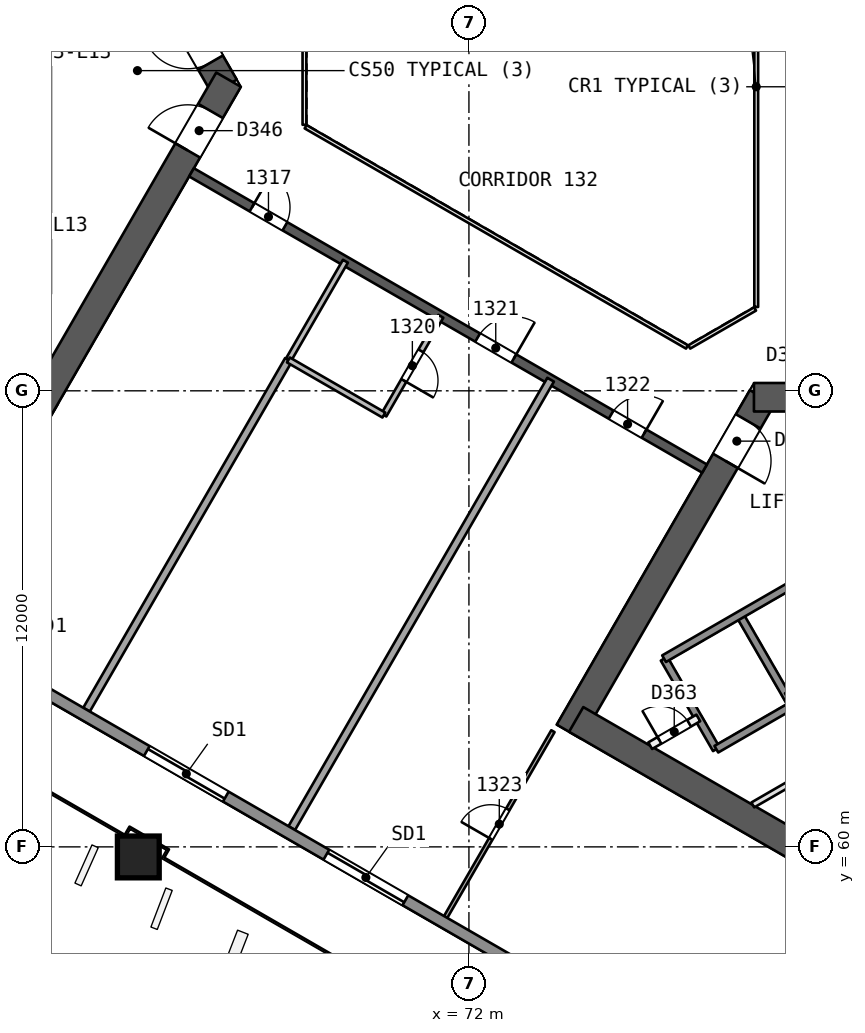
"""IFC4 building model, lengths in metres.
Left out: names, types, materials, properties, quantities, classifications, styles, units other than length and angle.
Written with IfcOpenShell. Run it as: python <this file> out.ifc"""

import sys

from ifc_helpers import new_model, si_unit, direction, frame, frame_2d, origin, origin_2d, place, context, subcontext, project, spatial, rectangle, extrude, element, fill, save


model = new_model("IFC4")
c1 = context("Model", 3, precision=1e-05, world=origin(), true_north=direction((0.0, 1.0)))
c2 = subcontext(c1, "Body", "Model", "MODEL_VIEW")
j1 = project(units=[si_unit("LENGTHUNIT", "METRE"), si_unit("PLANEANGLEUNIT", "RADIAN")], contexts=[c1])
p1 = place(None, origin())
s1 = spatial("IfcSite", under=j1, at=p1, CompositionType="ELEMENT")
p2 = place(p1, origin())
s2 = spatial("IfcBuilding", under=s1, at=p2, CompositionType="ELEMENT")
p3 = place(p2, frame((0.0, 0.0, 61.0)))
s3 = spatial("IfcBuildingStorey", under=s2, at=p3, CompositionType="ELEMENT", Elevation=61.0)
p4 = place(p3, frame((65.567, 80.0, 0.0), z_axis=(0.0, 0.0, 1.0), x_axis=(-0.499988615364, 0.866031976607, 0.0)))
e1 = element("IfcWall", 1, at=p4, inside=s3, PredefinedType="SHEAR", context=c2, shape_type="SweptSolid", body=[
    extrude(rectangle(XDim=10.163, YDim=0.75, at=frame_2d((5.082, 0.0))), origin(), (0.0, 0.0, 1.0), 3.7),
])
p5 = place(p4, frame((0.733, 0.0, 0.0)))
e2 = element("IfcOpeningElement", 2, at=p5, cuts=e1, PredefinedType="OPENING", context=c2, shape_type="SweptSolid", body=[
    extrude(rectangle(XDim=1.2, YDim=2.1, at=frame_2d((0.6, 1.05))), frame((0.0, 0.385, 0.0), z_axis=(0.0, -1.0, 0.0), x_axis=(1.0, 0.0, 0.0)), (0.0, 0.0, 1.0), 0.771),
])
p6 = place(p3, frame((48.772, 78.394, 0.0), z_axis=(0.0, 0.0, 1.0), x_axis=(0.866028339916, -0.499994914436, 0.0)))
e3 = element("IfcWall", 3, at=p6, inside=s3, PredefinedType="SHEAR", context=c2, shape_type="SweptSolid", body=[
    extrude(rectangle(XDim=14.117, YDim=0.75, at=frame_2d((7.059, 0.0))), origin(), (0.0, 0.0, 1.0), 3.7),
])
p7 = place(p3, frame((60.673, 71.523, 0.0), z_axis=(0.0, 0.0, 1.0), x_axis=(0.499997052475, 0.866027105532, 0.0)))
e4 = element("IfcWall", 4, at=p7, inside=s3, PredefinedType="SHEAR", context=c2, shape_type="SweptSolid", body=[
    extrude(rectangle(XDim=10.005, YDim=0.75, at=frame_2d((5.002, 0.0))), origin(), (0.0, 0.0, 1.0), 3.7),
])
p8 = place(p7, frame((7.855, 0.0, 0.0)))
e5 = element("IfcOpeningElement", 5, at=p8, cuts=e4, PredefinedType="OPENING", context=c2, shape_type="SweptSolid", body=[
    extrude(rectangle(XDim=1.2, YDim=2.1, at=frame_2d((0.6, 1.05))), frame((0.0, 0.385, 0.0), z_axis=(0.0, -1.0, 0.0), x_axis=(1.0, 0.0, 0.0)), (0.0, 0.0, 1.0), 0.771),
])
p9 = place(p3, frame((79.717, 71.831, 0.0), z_axis=(0.0, 0.0, 1.0), x_axis=(-0.499996230114, -0.866027580318, 0.0)))
e6 = element("IfcWall", 6, at=p9, inside=s3, PredefinedType="SHEAR", context=c2, shape_type="SweptSolid", body=[
    extrude(rectangle(XDim=10.164, YDim=0.75, at=frame_2d((5.082, 0.0))), origin(), (0.0, 0.0, 1.0), 3.7),
])
p10 = place(p9, frame((0.733, 0.0, 0.0)))
e7 = element("IfcOpeningElement", 7, at=p10, cuts=e6, PredefinedType="OPENING", context=c2, shape_type="SweptSolid", body=[
    extrude(rectangle(XDim=1.2, YDim=2.1, at=frame_2d((0.6, 1.05))), frame((0.0, 0.385, 0.0), z_axis=(0.0, -1.0, 0.0), x_axis=(1.0, 0.0, 0.0)), (0.0, 0.0, 1.0), 0.771),
])
p11 = place(p3, frame((74.822, 63.354, 0.0), z_axis=(0.0, 0.0, 1.0), x_axis=(0.8660248072, -0.500001033313, 0.0)))
e8 = element("IfcWall", 8, at=p11, inside=s3, PredefinedType="SHEAR", context=c2, shape_type="SweptSolid", body=[
    extrude(rectangle(XDim=13.958, YDim=0.75, at=frame_2d((6.979, 0.0))), origin(), (0.0, 0.0, 1.0), 3.7),
])
p12 = place(p3, frame((89.505, 71.831, 0.0), z_axis=(0.0, 0.0, 1.0), x_axis=(-1.0, 0.0, 0.0)))
e9 = element("IfcWall", 9, at=p12, inside=s3, PredefinedType="SHEAR", context=c2, shape_type="SweptSolid", body=[
    extrude(rectangle(XDim=10.005, YDim=0.75, at=frame_2d((5.002, 0.0))), origin(), (0.0, 0.0, 1.0), 3.7),
])
p13 = place(p12, frame((7.855, 0.0, 0.0)))
e10 = element("IfcOpeningElement", 10, at=p13, cuts=e9, PredefinedType="OPENING", context=c2, shape_type="SweptSolid", body=[
    extrude(rectangle(XDim=1.2, YDim=2.1, at=frame_2d((0.6, 1.05))), frame((0.0, 0.385, 0.0), z_axis=(0.0, -1.0, 0.0), x_axis=(1.0, 0.0, 0.0)), (0.0, 0.0, 1.0), 0.771),
])
p14 = place(p3, frame((64.7, 77.748, 0.0), z_axis=(0.0, 0.0, 1.0), x_axis=(0.866026492143, -0.499998114903, 0.0)))
e11 = element("IfcWall", 11, at=p14, inside=s3, PredefinedType="SHEAR", context=c2, shape_type="SweptSolid", body=[
    extrude(rectangle(XDim=15.588, YDim=0.25, at=frame_2d((7.794, 0.0))), origin(), (0.0, 0.0, 1.0), 3.2),
])
p15 = place(p14, frame((1.838, 0.0, 0.0)))
e12 = element("IfcOpeningElement", 12, at=p15, cuts=e11, PredefinedType="OPENING", context=c2, shape_type="SweptSolid", body=[
    extrude(rectangle(XDim=1.0, YDim=2.1, at=frame_2d((0.5, 1.05))), frame((0.0, 0.135, 0.0), z_axis=(0.0, -1.0, 0.0), x_axis=(1.0, 0.0, 0.0)), (0.0, 0.0, 1.0), 0.271),
])
p16 = place(p14, frame((8.694, 0.0, 0.0)))
e13 = element("IfcOpeningElement", 13, at=p16, cuts=e11, PredefinedType="OPENING", context=c2, shape_type="SweptSolid", body=[
    extrude(rectangle(XDim=1.1, YDim=2.1, at=frame_2d((0.55, 1.05))), frame((0.0, 0.135, 0.0), z_axis=(0.0, -1.0, 0.0), x_axis=(1.0, 0.0, 0.0)), (0.0, 0.0, 1.0), 0.271),
])
p17 = place(p14, frame((12.75, 0.0, 0.0)))
e14 = element("IfcOpeningElement", 14, at=p17, cuts=e11, PredefinedType="OPENING", context=c2, shape_type="SweptSolid", body=[
    extrude(rectangle(XDim=1.0, YDim=2.1, at=frame_2d((0.5, 1.05))), frame((0.0, 0.135, 0.0), z_axis=(0.0, -1.0, 0.0), x_axis=(1.0, 0.0, 0.0)), (0.0, 0.0, 1.0), 0.271),
])
p18 = place(p3, frame((63.288, 59.714, 0.0), z_axis=(0.010093620709, 0.017482414954, 0.999796221231), x_axis=(-0.499907122366, -0.865843723195, 0.020187025824)))
e15 = element("IfcColumn", 15, at=p18, inside=s3, PredefinedType="COLUMN", context=c2, shape_type="SweptSolid", body=[
    extrude(rectangle(XDim=1.1, YDim=1.1, at=origin_2d()), origin(), (0.0, 0.0, 1.0), 3.701),
])
p19 = place(p3, frame((61.938, 63.61, 0.0), z_axis=(0.0, 0.0, 1.0), x_axis=(0.499994284652, 0.866028703517, 0.0)))
e16 = element("IfcWall", 16, at=p19, inside=s3, PredefinedType="PARTITIONING", context=c2, shape_type="SweptSolid", body=[
    extrude(rectangle(XDim=10.625, YDim=0.2, at=frame_2d((5.312, 0.0))), origin(), (0.0, 0.0, 1.0), 3.2),
])
p20 = place(p3, frame((67.25, 72.812, 0.0), z_axis=(0.0, 0.0, 1.0), x_axis=(0.499990139034, 0.866031096941, 0.0)))
e17 = element("IfcWall", 17, at=p20, inside=s3, PredefinedType="PARTITIONING", context=c2, shape_type="SweptSolid", body=[
    extrude(rectangle(XDim=3.0, YDim=0.15, at=frame_2d((1.5, 0.0))), origin(), (0.0, 0.0, 1.0), 3.2),
])
p21 = place(p3, frame((71.261, 73.96, 0.0), z_axis=(0.0, 0.0, 1.0), x_axis=(-0.50002537861, -0.866010750942, 0.0)))
e18 = element("IfcWall", 18, at=p21, inside=s3, PredefinedType="PARTITIONING", context=c2, shape_type="SweptSolid", body=[
    extrude(rectangle(XDim=3.0, YDim=0.15, at=frame_2d((1.5, 0.0))), origin(), (0.0, 0.0, 1.0), 3.2),
])
p22 = place(p21, frame((1.05, 0.0, 0.0)))
e19 = element("IfcOpeningElement", 19, at=p22, cuts=e18, PredefinedType="OPENING", context=c2, shape_type="SweptSolid", body=[
    extrude(rectangle(XDim=0.9, YDim=2.1, at=frame_2d((0.45, 1.05))), frame((0.0, 0.085, 0.0), z_axis=(0.0, -1.0, 0.0), x_axis=(1.0, 0.0, 0.0)), (0.0, 0.0, 1.0), 0.171),
])
p23 = place(p3, frame((69.761, 71.362, 0.0), z_axis=(0.0, 0.0, 1.0), x_axis=(-0.866032775405, 0.499987231761, 0.0)))
e20 = element("IfcWall", 20, at=p23, inside=s3, PredefinedType="PARTITIONING", context=c2, shape_type="SweptSolid", body=[
    extrude(rectangle(XDim=2.9, YDim=0.15, at=frame_2d((1.45, 0.0))), origin(), (0.0, 0.0, 1.0), 3.2),
])
p24 = place(p3, frame((67.337, 60.493, 0.0), z_axis=(0.0, 0.0, 1.0), x_axis=(0.49999337185, 0.866029230515, 0.0)))
e21 = element("IfcWall", 21, at=p24, inside=s3, PredefinedType="PARTITIONING", context=c2, shape_type="SweptSolid", body=[
    extrude(rectangle(XDim=13.625, YDim=0.2, at=frame_2d((6.812, 0.0))), origin(), (0.0, 0.0, 1.0), 3.2),
])
p25 = place(p3, frame((71.387, 58.154, 0.0), z_axis=(0.0, 0.0, 1.0), x_axis=(0.499975725007, 0.866039418504, 0.0)))
e22 = element("IfcWall", 22, at=p25, inside=s3, PredefinedType="PARTITIONING", context=c2, shape_type="SweptSolid", body=[
    extrude(rectangle(XDim=5.646, YDim=0.1, at=frame_2d((2.823, 0.0))), origin(), (0.0, 0.0, 1.0), 3.2),
])
p26 = place(p25, frame((2.373, 0.0, 0.0)))
e23 = element("IfcOpeningElement", 23, at=p26, cuts=e22, PredefinedType="OPENING", context=c2, shape_type="SweptSolid", body=[
    extrude(rectangle(XDim=0.9, YDim=2.1, at=frame_2d((0.45, 1.05))), frame((0.0, 0.061, 0.0), z_axis=(0.0, -1.0, 0.0), x_axis=(1.0, 0.0, 0.0)), (0.0, 0.0, 1.0), 0.121),
])
p27 = place(p3, frame((90.555, 46.916, 0.0), z_axis=(0.0, 0.0, 1.0), x_axis=(-0.866024926003, 0.500000827541, 0.0)))
e24 = element("IfcWall", 24, at=p27, inside=s3, PredefinedType="SOLIDWALL", context=c2, shape_type="SweptSolid", body=[
    extrude(rectangle(XDim=60.025, YDim=0.3, at=frame_2d((30.013, 0.0))), origin(), (0.0, 0.0, 1.0), 3.2),
])
p28 = place(p27, frame((28.813, 0.0, 0.0)))
e25 = element("IfcOpeningElement", 25, at=p28, cuts=e24, PredefinedType="OPENING", context=c2, shape_type="SweptSolid", body=[
    extrude(rectangle(XDim=2.4, YDim=2.4, at=frame_2d((1.2, 1.2))), frame((0.0, 0.161, 0.0), z_axis=(0.0, -1.0, 0.0), x_axis=(1.0, 0.0, 0.0)), (0.0, 0.0, 1.0), 0.321),
])
p29 = place(p27, frame((34.269, 0.0, 0.0)))
e26 = element("IfcOpeningElement", 26, at=p29, cuts=e24, PredefinedType="OPENING", context=c2, shape_type="SweptSolid", body=[
    extrude(rectangle(XDim=2.4, YDim=2.4, at=frame_2d((1.2, 1.2))), frame((0.0, 0.161, 0.0), z_axis=(0.0, -1.0, 0.0), x_axis=(1.0, 0.0, 0.0)), (0.0, 0.0, 1.0), 0.321),
])
p30 = place(p27, frame((46.558, 0.0, 0.0)))
e27 = element("IfcOpeningElement", 27, at=p30, cuts=e24, PredefinedType="OPENING", context=c2, shape_type="SweptSolid", body=[
    extrude(rectangle(XDim=2.4, YDim=2.4, at=frame_2d((1.2, 1.2))), frame((0.0, 0.161, 0.0), z_axis=(0.0, -1.0, 0.0), x_axis=(1.0, 0.0, 0.0)), (0.0, 0.0, 1.0), 0.321),
])
p31 = place(p27, frame((23.357, 0.0, 0.0)))
e28 = element("IfcOpeningElement", 28, at=p31, cuts=e24, PredefinedType="OPENING", context=c2, shape_type="SweptSolid", body=[
    extrude(rectangle(XDim=2.4, YDim=2.4, at=frame_2d((1.2, 1.2))), frame((0.0, 0.161, 0.0), z_axis=(0.0, -1.0, 0.0), x_axis=(1.0, 0.0, 0.0)), (0.0, 0.0, 1.0), 0.321),
])
p32 = place(p27, frame((11.109, 0.0, 0.0)))
e29 = element("IfcOpeningElement", 29, at=p32, cuts=e24, PredefinedType="OPENING", context=c2, shape_type="SweptSolid", body=[
    extrude(rectangle(XDim=2.4, YDim=2.4, at=frame_2d((1.2, 1.2))), frame((0.0, 0.161, 0.0), z_axis=(0.0, -1.0, 0.0), x_axis=(1.0, 0.0, 0.0)), (0.0, 0.0, 1.0), 0.321),
])
for number, where, z_axis, x_axis in (
    (30, (77.135, 64.952, 0.0), (0.0, 0.0, 1.0), (0.5, -0.866, 0.0)),
    (31, (79.127, 66.102, 0.0), (0.0, 0.0, 1.0), (0.5, -0.866, 0.0)),
):
    element("IfcWall", number, at=place(p3, frame(where, z_axis=z_axis, x_axis=x_axis)), inside=s3, PredefinedType="SOLIDWALL", context=c2, shape_type="SweptSolid", body=[
        extrude(rectangle(XDim=2.75, YDim=0.2, at=frame_2d((1.375, 0.0))), origin(), (0.0, 0.0, 1.0), 3.2),
    ])
p33 = place(p3, frame((77.135, 64.952, 0.0), z_axis=(0.0, 0.0, 1.0), x_axis=(0.866031916153, 0.499988720078, 0.0)))
e32 = element("IfcWall", 32, at=p33, inside=s3, PredefinedType="SOLIDWALL", context=c2, shape_type="SweptSolid", body=[
    extrude(rectangle(XDim=11.35, YDim=0.2, at=frame_2d((5.675, 0.0))), origin(), (0.0, 0.0, 1.0), 3.2),
])
p34 = place(p3, frame((76.77, 62.662, 0.0), z_axis=(0.0, 0.0, 1.0), x_axis=(0.866054810376, 0.49994906283, 0.0)))
e33 = element("IfcWall", 33, at=p34, inside=s3, PredefinedType="PARTITIONING", context=c2, shape_type="SweptSolid", body=[
    extrude(rectangle(XDim=1.461, YDim=0.2, at=frame_2d((0.73, 0.0))), origin(), (0.0, 0.0, 1.0), 3.2),
])
p35 = place(p34, frame((0.281, 0.0, 0.0)))
e34 = element("IfcOpeningElement", 34, at=p35, cuts=e33, PredefinedType="OPENING", context=c2, shape_type="SweptSolid", body=[
    extrude(rectangle(XDim=0.9, YDim=2.1, at=frame_2d((0.45, 1.05))), frame((0.0, 0.11, 0.0), z_axis=(0.0, -1.0, 0.0), x_axis=(1.0, 0.0, 0.0)), (0.0, 0.0, 1.0), 0.221),
])
p36 = place(p3, frame((80.367, 63.954, 0.0), z_axis=(0.0, 0.0, 1.0), x_axis=(0.866026575979, 0.499997969693, 0.0)))
e35 = element("IfcWall", 35, at=p36, inside=s3, PredefinedType="SOLIDWALL", context=c2, shape_type="SweptSolid", body=[
    extrude(rectangle(XDim=6.75, YDim=0.2, at=frame_2d((3.375, 0.0))), origin(), (0.0, 0.0, 1.0), 3.2),
])
p37 = place(p3, frame((78.51, 62.57, 0.0), z_axis=(0.0, 0.0, 1.0), x_axis=(0.866053019151, 0.499952165731, 0.0)))
e36 = element("IfcWall", 36, at=p37, inside=s3, PredefinedType="SOLIDWALL", context=c2, shape_type="SweptSolid", body=[
    extrude(rectangle(XDim=2.3, YDim=0.2, at=frame_2d((1.15, 0.0))), origin(), (0.0, 0.0, 1.0), 3.2),
])
p38 = place(p3, frame((79.47, 61.103, 0.0), z_axis=(0.0, 0.0, 1.0), x_axis=(0.866021168401, 0.500007335828, 0.0)))
e37 = element("IfcWall", 37, at=p38, inside=s3, PredefinedType="PARTITIONING", context=c2, shape_type="SweptSolid", body=[
    extrude(rectangle(XDim=2.077, YDim=0.15, at=frame_2d((1.039, 0.0))), origin(), (0.0, 0.0, 1.0), 3.2),
])
p39 = place(p3, frame((79.56, 74.206, 0.0), z_axis=(0.0, 0.0, 1.0), x_axis=(0.0, 1.0, 0.0)))
e38 = element("IfcWall", 38, at=p39, inside=s3, PredefinedType="PARTITIONING", context=c2, shape_type="SweptSolid", body=[
    extrude(rectangle(XDim=11.588, YDim=0.1, at=frame_2d((5.794, 0.0))), origin(), (0.0, 0.0, 1.0), 3.2),
])
p40 = place(p3, frame((67.672, 81.0, 0.0), z_axis=(0.0, 0.0, 1.0), x_axis=(0.0, -1.0, 0.0)))
e39 = element("IfcWall", 39, at=p40, inside=s3, PredefinedType="PARTITIONING", context=c2, shape_type="SweptSolid", body=[
    extrude(rectangle(XDim=2.0, YDim=0.1, at=frame_2d((1.0, 0.0))), origin(), (0.0, 0.0, 1.0), 3.2),
])
p41 = place(p3, frame((67.702, 78.948, 0.0), z_axis=(0.0, 0.0, 1.0), x_axis=(0.866026658274, -0.499997827154, 0.0)))
e40 = element("IfcWall", 40, at=p41, inside=s3, PredefinedType="PARTITIONING", context=c2, shape_type="SweptSolid", body=[
    extrude(rectangle(XDim=11.588, YDim=0.1, at=frame_2d((5.794, 0.0))), origin(), (0.0, 0.0, 1.0), 3.2),
])
p42 = place(p3, frame((77.798, 73.154, 0.0), z_axis=(0.0, 0.0, 1.0), x_axis=(0.866041268327, 0.499972520799, 0.0)))
e41 = element("IfcWall", 41, at=p42, inside=s3, PredefinedType="PARTITIONING", context=c2, shape_type="SweptSolid", body=[
    extrude(rectangle(XDim=2.0, YDim=0.1, at=frame_2d((1.0, 0.0))), origin(), (0.0, 0.0, 1.0), 3.2),
])
p43 = place(p15, origin())
e42 = element("IfcDoor", 42, at=p43, inside=s3, OperationType="SINGLE_SWING_LEFT", PredefinedType="NOTDEFINED", context=c2, shape_type="SweptSolid", body=[
    extrude(rectangle(XDim=1.0, YDim=2.1, at=frame_2d((0.5, 1.05))), frame((0.0, 0.025, 0.0), z_axis=(0.0, -1.0, 0.0), x_axis=(1.0, 0.0, 0.0)), (0.0, 0.0, 1.0), 0.05),
])
fill(e12, e42)
p44 = place(p22, origin())
e43 = element("IfcDoor", 43, at=p44, inside=s3, OperationType="SINGLE_SWING_RIGHT", PredefinedType="NOTDEFINED", context=c2, shape_type="SweptSolid", body=[
    extrude(rectangle(XDim=0.9, YDim=2.1, at=frame_2d((0.45, 1.05))), frame((0.0, 0.025, 0.0), z_axis=(0.0, -1.0, 0.0), x_axis=(1.0, 0.0, 0.0)), (0.0, 0.0, 1.0), 0.05),
])
fill(e19, e43)
p45 = place(p16, origin())
e44 = element("IfcDoor", 44, at=p45, inside=s3, OperationType="SINGLE_SWING_RIGHT", PredefinedType="NOTDEFINED", context=c2, shape_type="SweptSolid", body=[
    extrude(rectangle(XDim=1.1, YDim=2.1, at=frame_2d((0.55, 1.05))), frame((0.0, 0.025, 0.0), z_axis=(0.0, -1.0, 0.0), x_axis=(1.0, 0.0, 0.0)), (0.0, 0.0, 1.0), 0.05),
])
fill(e13, e44)
p46 = place(p17, origin())
e45 = element("IfcDoor", 45, at=p46, inside=s3, OperationType="SINGLE_SWING_RIGHT", PredefinedType="NOTDEFINED", context=c2, shape_type="SweptSolid", body=[
    extrude(rectangle(XDim=1.0, YDim=2.1, at=frame_2d((0.5, 1.05))), frame((0.0, 0.025, 0.0), z_axis=(0.0, -1.0, 0.0), x_axis=(1.0, 0.0, 0.0)), (0.0, 0.0, 1.0), 0.05),
])
fill(e14, e45)
p47 = place(p26, origin())
e46 = element("IfcDoor", 46, at=p47, inside=s3, OperationType="SINGLE_SWING_LEFT", PredefinedType="NOTDEFINED", context=c2, shape_type="SweptSolid", body=[
    extrude(rectangle(XDim=0.9, YDim=2.1, at=frame_2d((0.45, 1.05))), frame((0.0, 0.025, 0.0), z_axis=(0.0, -1.0, 0.0), x_axis=(1.0, 0.0, 0.0)), (0.0, 0.0, 1.0), 0.05),
])
fill(e23, e46)
p48 = place(p28, origin())
e47 = element("IfcDoor", 47, at=p48, inside=s3, OperationType="SLIDING_TO_LEFT", PredefinedType="NOTDEFINED", context=c2, shape_type="SweptSolid", body=[
    extrude(rectangle(XDim=2.4, YDim=2.4, at=frame_2d((1.2, 1.2))), frame((0.0, 0.025, 0.0), z_axis=(0.0, -1.0, 0.0), x_axis=(1.0, 0.0, 0.0)), (0.0, 0.0, 1.0), 0.05),
])
fill(e25, e47)
p49 = place(p31, origin())
e48 = element("IfcDoor", 48, at=p49, inside=s3, OperationType="SLIDING_TO_RIGHT", PredefinedType="NOTDEFINED", context=c2, shape_type="SweptSolid", body=[
    extrude(rectangle(XDim=2.4, YDim=2.4, at=frame_2d((1.2, 1.2))), frame((0.0, 0.025, 0.0), z_axis=(0.0, -1.0, 0.0), x_axis=(1.0, 0.0, 0.0)), (0.0, 0.0, 1.0), 0.05),
])
fill(e28, e48)
p50 = place(p5, origin())
e49 = element("IfcDoor", 49, at=p50, inside=s3, OperationType="SINGLE_SWING_RIGHT", PredefinedType="NOTDEFINED", context=c2, shape_type="SweptSolid", body=[
    extrude(rectangle(XDim=1.2, YDim=2.1, at=frame_2d((0.6, 1.05))), frame((0.0, 0.025, 0.0), z_axis=(0.0, -1.0, 0.0), x_axis=(1.0, 0.0, 0.0)), (0.0, 0.0, 1.0), 0.05),
])
fill(e2, e49)
p51 = place(p8, origin())
e50 = element("IfcDoor", 50, at=p51, inside=s3, OperationType="SINGLE_SWING_LEFT", PredefinedType="NOTDEFINED", context=c2, shape_type="SweptSolid", body=[
    extrude(rectangle(XDim=1.2, YDim=2.1, at=frame_2d((0.6, 1.05))), frame((0.0, 0.025, 0.0), z_axis=(0.0, -1.0, 0.0), x_axis=(1.0, 0.0, 0.0)), (0.0, 0.0, 1.0), 0.05),
])
fill(e5, e50)
p52 = place(p10, origin())
e51 = element("IfcDoor", 51, at=p52, inside=s3, OperationType="SINGLE_SWING_RIGHT", PredefinedType="NOTDEFINED", context=c2, shape_type="SweptSolid", body=[
    extrude(rectangle(XDim=1.2, YDim=2.1, at=frame_2d((0.6, 1.05))), frame((0.0, 0.025, 0.0), z_axis=(0.0, -1.0, 0.0), x_axis=(1.0, 0.0, 0.0)), (0.0, 0.0, 1.0), 0.05),
])
fill(e7, e51)
p53 = place(p35, origin())
e52 = element("IfcDoor", 52, at=p53, inside=s3, OperationType="SINGLE_SWING_LEFT", PredefinedType="NOTDEFINED", context=c2, shape_type="SweptSolid", body=[
    extrude(rectangle(XDim=0.9, YDim=2.1, at=frame_2d((0.45, 1.05))), frame((0.0, 0.025, 0.0), z_axis=(0.0, -1.0, 0.0), x_axis=(1.0, 0.0, 0.0)), (0.0, 0.0, 1.0), 0.05),
])
fill(e34, e52)
save(model, sys.argv[1])
